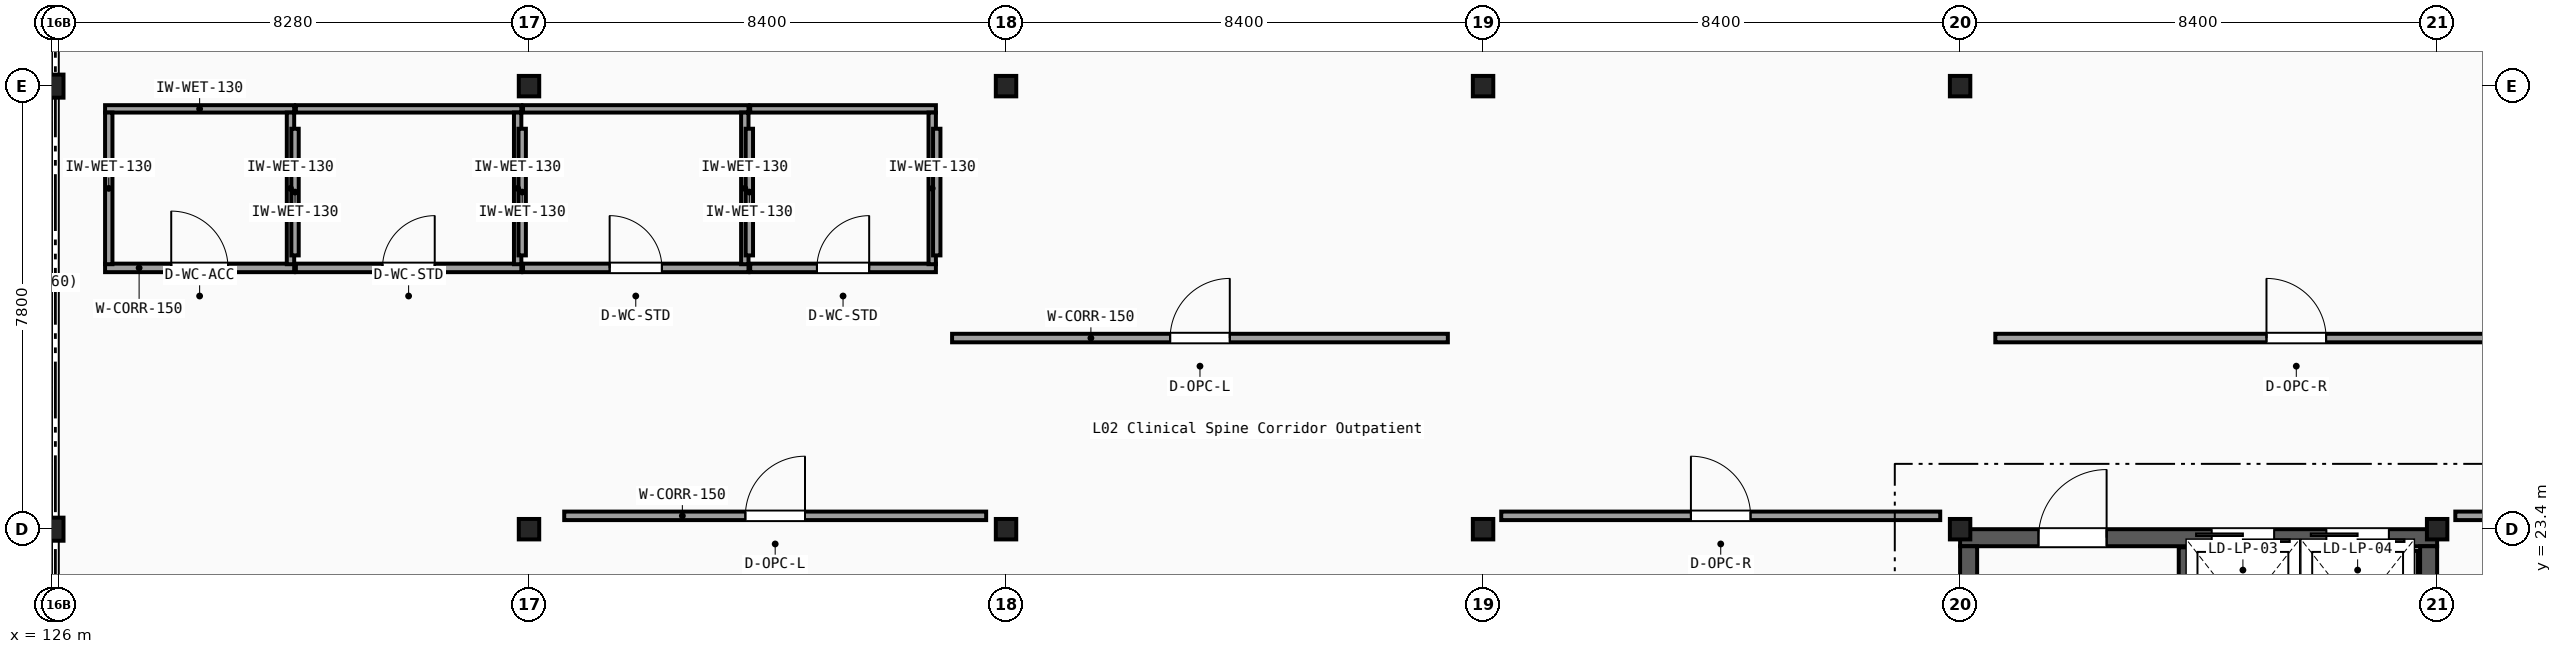
"""IFC4 building model, lengths in metres.
Left out: names, types, materials, properties, quantities, classifications, styles, units other than length and angle.
Written with IfcOpenShell. Run it as: python <this file> out.ifc"""

import sys

from ifc_helpers import new_model, si_unit, direction, frame, frame_2d, origin, origin_2d, place, context, subcontext, project, spatial, rectangle, hollow_circle, i_section, extrude, element, fill, save


model = new_model("IFC4")
c1 = context("Model", 3, precision=1e-05, world=origin(), true_north=direction((0.0, 1.0)))
c2 = subcontext(c1, "Body", "Model", "MODEL_VIEW")
j1 = project(units=[si_unit("LENGTHUNIT", "METRE"), si_unit("PLANEANGLEUNIT", "RADIAN")], contexts=[c1])
p1 = place(None, origin())
s1 = spatial("IfcSite", under=j1, at=p1, CompositionType="ELEMENT")
p2 = place(p1, origin())
s2 = spatial("IfcBuilding", under=s1, at=p2, CompositionType="ELEMENT")
p3 = place(p2, frame((0.0, 0.0, 10.2)))
s3 = spatial("IfcBuildingStorey", under=s2, at=p3, CompositionType="ELEMENT", Elevation=10.2)
for number, where, z_axis, x_axis in (
    (1, (134.4, 23.4, 0.0), (0.0, 0.0, 1.0), (1.0, 0.0, 0.0)),
    (2, (134.4, 31.2, 0.0), (0.0, 0.0, 1.0), (1.0, 0.0, 0.0)),
    (3, (142.8, 23.4, 0.0), (0.0, 0.0, 1.0), (1.0, 0.0, 0.0)),
    (4, (142.8, 31.2, 0.0), (0.0, 0.0, 1.0), (1.0, 0.0, 0.0)),
    (5, (151.2, 23.4, 0.0), (0.0, 0.0, 1.0), (1.0, 0.0, 0.0)),
    (6, (151.2, 31.2, 0.0), (0.0, 0.0, 1.0), (1.0, 0.0, 0.0)),
    (7, (159.6, 23.4, 0.0), (0.0, 0.0, 1.0), (1.0, 0.0, 0.0)),
    (8, (159.6, 31.2, 0.0), (0.0, 0.0, 1.0), (1.0, 0.0, 0.0)),
    (9, (168.0, 23.4, 0.0), (0.0, 0.0, 1.0), (1.0, 0.0, 0.0)),
):
    element("IfcColumn", number, at=place(p3, frame(where, z_axis=z_axis, x_axis=x_axis)), inside=s3, PredefinedType="COLUMN", context=c2, shape_type="SweptSolid", body=[
        extrude(i_section(OverallWidth=0.3, OverallDepth=0.36, WebThickness=0.012, FlangeThickness=0.022, FilletRadius=0.027, at=origin_2d()), origin(), (0.0, 0.0, 1.0), 4.65),
    ])
for number, where, z_axis, x_axis in (
    (10, (126.0, 23.4, 0.0), (0.0, 0.0, 1.0), (1.0, 0.0, 0.0)),
    (11, (126.0, 31.2, 0.0), (0.0, 0.0, 1.0), (1.0, 0.0, 0.0)),
):
    element("IfcColumn", number, at=place(p3, frame(where, z_axis=z_axis, x_axis=x_axis)), inside=s3, PredefinedType="COLUMN", context=c2, shape_type="SweptSolid", body=[
        extrude(hollow_circle(Radius=0.203, WallThickness=0.02, at=origin_2d()), origin(), (0.0, 0.0, 1.0), 4.65),
    ])
p4 = place(p3, frame((159.6, 23.25, 0.0), z_axis=(0.0, 0.0, 1.0), x_axis=(1.0, 0.0, 0.0)))
e12 = element("IfcWall", 12, at=p4, inside=s3, PredefinedType="SHEAR", context=c2, shape_type="SweptSolid", body=[
    extrude(rectangle(XDim=8.4, YDim=0.3, at=frame_2d((4.2, 0.0))), origin(), (0.0, 0.0, 1.0), 4.42),
])
p5 = place(p4, frame((1.38, 0.0, 0.0)))
e13 = element("IfcOpeningElement", 13, at=p5, cuts=e12, PredefinedType="OPENING", context=c2, shape_type="SweptSolid", body=[
    extrude(rectangle(XDim=1.2, YDim=2.15, at=frame_2d((0.6, 1.075))), frame((0.0, 0.16, 0.0), z_axis=(0.0, -1.0, 0.0), x_axis=(1.0, 0.0, 0.0)), (0.0, 0.0, 1.0), 0.32),
])
p6 = place(p4, frame((4.43, 0.0, 0.0)))
e14 = element("IfcOpeningElement", 14, at=p6, cuts=e12, PredefinedType="OPENING", context=c2, shape_type="SweptSolid", body=[
    extrude(rectangle(XDim=1.1, YDim=2.15, at=frame_2d((0.55, 1.075))), frame((0.0, 0.16, 0.0), z_axis=(0.0, -1.0, 0.0), x_axis=(1.0, 0.0, 0.0)), (0.0, 0.0, 1.0), 0.32),
])
p7 = place(p4, frame((6.45, 0.0, 0.0)))
e15 = element("IfcOpeningElement", 15, at=p7, cuts=e12, PredefinedType="OPENING", context=c2, shape_type="SweptSolid", body=[
    extrude(rectangle(XDim=1.1, YDim=2.15, at=frame_2d((0.55, 1.075))), frame((0.0, 0.16, 0.0), z_axis=(0.0, -1.0, 0.0), x_axis=(1.0, 0.0, 0.0)), (0.0, 0.0, 1.0), 0.32),
])
for number, where, z_axis, x_axis in (
    (16, (159.75, 15.9, 0.0), (0.0, 0.0, 1.0), (0.0, 1.0, 0.0)),
    (17, (167.85, 15.9, 0.0), (0.0, 0.0, 1.0), (0.0, 1.0, 0.0)),
):
    element("IfcWall", number, at=place(p3, frame(where, z_axis=z_axis, x_axis=x_axis)), inside=s3, PredefinedType="SHEAR", context=c2, shape_type="SweptSolid", body=[
        extrude(rectangle(XDim=7.2, YDim=0.3, at=frame_2d((3.6, 0.0))), origin(), (0.0, 0.0, 1.0), 4.42),
    ])
p8 = place(p3, frame((163.55, 15.92, 0.0), z_axis=(0.0, 0.0, 1.0), x_axis=(0.0, 1.0, 0.0)))
e18 = element("IfcWall", 18, at=p8, inside=s3, PredefinedType="SHEAR", context=c2, shape_type="SweptSolid", body=[
    extrude(rectangle(XDim=7.16, YDim=0.2, at=frame_2d((3.58, 0.0))), origin(), (0.0, 0.0, 1.0), 4.42),
])
for number, where, z_axis, x_axis in (
    (19, (165.54, 20.88, 0.0), (0.0, 0.0, 1.0), (0.0, 1.0, 0.0)),
    (20, (167.56, 20.88, 0.0), (0.0, 0.0, 1.0), (0.0, 1.0, 0.0)),
):
    element("IfcWall", number, at=place(p3, frame(where, z_axis=z_axis, x_axis=x_axis)), inside=s3, PredefinedType="PARTITIONING", context=c2, shape_type="SweptSolid", body=[
        extrude(rectangle(XDim=2.14, YDim=0.2, at=frame_2d((1.07, 0.0))), origin(), (0.0, 0.0, 1.0), 3.9),
    ])
p9 = place(p3, frame((126.935, 28.0, 0.0), z_axis=(0.0, 0.0, 1.0), x_axis=(1.0, 0.0, 0.0)))
e21 = element("IfcWall", 21, at=p9, inside=s3, PredefinedType="PARTITIONING", context=c2, shape_type="SweptSolid", body=[
    extrude(rectangle(XDim=3.33, YDim=0.15, at=frame_2d((1.665, 0.0))), origin(), (0.0, 0.0, 1.0), 4.37),
])
p10 = place(p9, frame((1.165, 0.0, 0.0)))
e22 = element("IfcOpeningElement", 22, at=p10, cuts=e21, PredefinedType="OPENING", context=c2, shape_type="SweptSolid", body=[
    extrude(rectangle(XDim=1.0, YDim=2.15, at=frame_2d((0.5, 1.075))), frame((0.0, 0.085, 0.0), z_axis=(0.0, -1.0, 0.0), x_axis=(1.0, 0.0, 0.0)), (0.0, 0.0, 1.0), 0.17),
])
p11 = place(p3, frame((126.935, 30.8, 0.0), z_axis=(0.0, 0.0, 1.0), x_axis=(1.0, 0.0, 0.0)))
e23 = element("IfcWall", 23, at=p11, inside=s3, PredefinedType="PARTITIONING", context=c2, shape_type="SweptSolid", body=[
    extrude(rectangle(XDim=3.33, YDim=0.13, at=frame_2d((1.665, 0.0))), origin(), (0.0, 0.0, 1.0), 4.37),
])
for number, where, z_axis, x_axis in (
    (24, (127.0, 28.065, 0.0), (0.0, 0.0, 1.0), (0.0, 1.0, 0.0)),
    (25, (130.2, 28.065, 0.0), (0.0, 0.0, 1.0), (0.0, 1.0, 0.0)),
):
    element("IfcWall", number, at=place(p3, frame(where, z_axis=z_axis, x_axis=x_axis)), inside=s3, PredefinedType="PARTITIONING", context=c2, shape_type="SweptSolid", body=[
        extrude(rectangle(XDim=2.67, YDim=0.13, at=frame_2d((1.335, 0.0))), origin(), (0.0, 0.0, 1.0), 4.37),
    ])
p12 = place(p3, frame((130.28, 28.22, 0.0), z_axis=(0.0, 0.0, 1.0), x_axis=(0.0, 1.0, 0.0)))
e26 = element("IfcWall", 26, at=p12, inside=s3, PredefinedType="PARTITIONING", context=c2, shape_type="SweptSolid", body=[
    extrude(rectangle(XDim=2.23, YDim=0.13, at=frame_2d((1.115, 0.0))), origin(), (0.0, 0.0, 1.0), 4.37),
])
p13 = place(p3, frame((130.295, 28.0, 0.0), z_axis=(0.0, 0.0, 1.0), x_axis=(1.0, 0.0, 0.0)))
e27 = element("IfcWall", 27, at=p13, inside=s3, PredefinedType="PARTITIONING", context=c2, shape_type="SweptSolid", body=[
    extrude(rectangle(XDim=3.97, YDim=0.15, at=frame_2d((1.985, 0.0))), origin(), (0.0, 0.0, 1.0), 4.0),
])
p14 = place(p13, frame((1.525, 0.0, 0.0)))
e28 = element("IfcOpeningElement", 28, at=p14, cuts=e27, PredefinedType="OPENING", context=c2, shape_type="SweptSolid", body=[
    extrude(rectangle(XDim=0.92, YDim=2.15, at=frame_2d((0.46, 1.075))), frame((0.0, 0.085, 0.0), z_axis=(0.0, -1.0, 0.0), x_axis=(1.0, 0.0, 0.0)), (0.0, 0.0, 1.0), 0.17),
])
p15 = place(p3, frame((130.295, 30.8, 0.0), z_axis=(0.0, 0.0, 1.0), x_axis=(1.0, 0.0, 0.0)))
e29 = element("IfcWall", 29, at=p15, inside=s3, PredefinedType="PARTITIONING", context=c2, shape_type="SweptSolid", body=[
    extrude(rectangle(XDim=3.97, YDim=0.13, at=frame_2d((1.985, 0.0))), origin(), (0.0, 0.0, 1.0), 4.0),
])
p16 = place(p3, frame((134.2, 28.065, 0.0), z_axis=(0.0, 0.0, 1.0), x_axis=(0.0, 1.0, 0.0)))
e30 = element("IfcWall", 30, at=p16, inside=s3, PredefinedType="PARTITIONING", context=c2, shape_type="SweptSolid", body=[
    extrude(rectangle(XDim=2.67, YDim=0.13, at=frame_2d((1.335, 0.0))), origin(), (0.0, 0.0, 1.0), 4.0),
])
p17 = place(p3, frame((134.28, 28.22, 0.0), z_axis=(0.0, 0.0, 1.0), x_axis=(0.0, 1.0, 0.0)))
e31 = element("IfcWall", 31, at=p17, inside=s3, PredefinedType="PARTITIONING", context=c2, shape_type="SweptSolid", body=[
    extrude(rectangle(XDim=2.23, YDim=0.13, at=frame_2d((1.115, 0.0))), origin(), (0.0, 0.0, 1.0), 4.0),
])
p18 = place(p3, frame((134.295, 28.0, 0.0), z_axis=(0.0, 0.0, 1.0), x_axis=(1.0, 0.0, 0.0)))
e32 = element("IfcWall", 32, at=p18, inside=s3, PredefinedType="PARTITIONING", context=c2, shape_type="SweptSolid", body=[
    extrude(rectangle(XDim=3.97, YDim=0.15, at=frame_2d((1.985, 0.0))), origin(), (0.0, 0.0, 1.0), 4.0),
])
p19 = place(p18, frame((1.525, 0.0, 0.0)))
e33 = element("IfcOpeningElement", 33, at=p19, cuts=e32, PredefinedType="OPENING", context=c2, shape_type="SweptSolid", body=[
    extrude(rectangle(XDim=0.92, YDim=2.15, at=frame_2d((0.46, 1.075))), frame((0.0, 0.085, 0.0), z_axis=(0.0, -1.0, 0.0), x_axis=(1.0, 0.0, 0.0)), (0.0, 0.0, 1.0), 0.17),
])
p20 = place(p3, frame((134.295, 30.8, 0.0), z_axis=(0.0, 0.0, 1.0), x_axis=(1.0, 0.0, 0.0)))
e34 = element("IfcWall", 34, at=p20, inside=s3, PredefinedType="PARTITIONING", context=c2, shape_type="SweptSolid", body=[
    extrude(rectangle(XDim=3.97, YDim=0.13, at=frame_2d((1.985, 0.0))), origin(), (0.0, 0.0, 1.0), 4.0),
])
p21 = place(p3, frame((138.2, 28.065, 0.0), z_axis=(0.0, 0.0, 1.0), x_axis=(0.0, 1.0, 0.0)))
e35 = element("IfcWall", 35, at=p21, inside=s3, PredefinedType="PARTITIONING", context=c2, shape_type="SweptSolid", body=[
    extrude(rectangle(XDim=2.67, YDim=0.13, at=frame_2d((1.335, 0.0))), origin(), (0.0, 0.0, 1.0), 4.37),
])
p22 = place(p3, frame((138.28, 28.22, 0.0), z_axis=(0.0, 0.0, 1.0), x_axis=(0.0, 1.0, 0.0)))
e36 = element("IfcWall", 36, at=p22, inside=s3, PredefinedType="PARTITIONING", context=c2, shape_type="SweptSolid", body=[
    extrude(rectangle(XDim=2.23, YDim=0.13, at=frame_2d((1.115, 0.0))), origin(), (0.0, 0.0, 1.0), 4.37),
])
p23 = place(p3, frame((138.295, 28.0, 0.0), z_axis=(0.0, 0.0, 1.0), x_axis=(1.0, 0.0, 0.0)))
e37 = element("IfcWall", 37, at=p23, inside=s3, PredefinedType="PARTITIONING", context=c2, shape_type="SweptSolid", body=[
    extrude(rectangle(XDim=3.27, YDim=0.15, at=frame_2d((1.635, 0.0))), origin(), (0.0, 0.0, 1.0), 4.37),
])
p24 = place(p23, frame((1.175, 0.0, 0.0)))
e38 = element("IfcOpeningElement", 38, at=p24, cuts=e37, PredefinedType="OPENING", context=c2, shape_type="SweptSolid", body=[
    extrude(rectangle(XDim=0.92, YDim=2.15, at=frame_2d((0.46, 1.075))), frame((0.0, 0.085, 0.0), z_axis=(0.0, -1.0, 0.0), x_axis=(1.0, 0.0, 0.0)), (0.0, 0.0, 1.0), 0.17),
])
p25 = place(p3, frame((138.295, 30.8, 0.0), z_axis=(0.0, 0.0, 1.0), x_axis=(1.0, 0.0, 0.0)))
e39 = element("IfcWall", 39, at=p25, inside=s3, PredefinedType="PARTITIONING", context=c2, shape_type="SweptSolid", body=[
    extrude(rectangle(XDim=3.27, YDim=0.13, at=frame_2d((1.635, 0.0))), origin(), (0.0, 0.0, 1.0), 4.37),
])
p26 = place(p3, frame((141.5, 28.065, 0.0), z_axis=(0.0, 0.0, 1.0), x_axis=(0.0, 1.0, 0.0)))
e40 = element("IfcWall", 40, at=p26, inside=s3, PredefinedType="PARTITIONING", context=c2, shape_type="SweptSolid", body=[
    extrude(rectangle(XDim=2.67, YDim=0.13, at=frame_2d((1.335, 0.0))), origin(), (0.0, 0.0, 1.0), 4.37),
])
p27 = place(p3, frame((141.58, 28.22, 0.0), z_axis=(0.0, 0.0, 1.0), x_axis=(0.0, 1.0, 0.0)))
e41 = element("IfcWall", 41, at=p27, inside=s3, PredefinedType="PARTITIONING", context=c2, shape_type="SweptSolid", body=[
    extrude(rectangle(XDim=2.23, YDim=0.13, at=frame_2d((1.115, 0.0))), origin(), (0.0, 0.0, 1.0), 4.37),
])
p28 = place(p3, frame((135.02, 23.635, 0.0), z_axis=(0.0, 0.0, 1.0), x_axis=(1.0, 0.0, 0.0)))
e42 = element("IfcWall", 42, at=p28, inside=s3, PredefinedType="PARTITIONING", context=c2, shape_type="SweptSolid", body=[
    extrude(rectangle(XDim=7.43, YDim=0.15, at=frame_2d((3.715, 0.0))), origin(), (0.0, 0.0, 1.0), 3.9),
])
p29 = place(p28, frame((3.19, 0.0, 0.0)))
e43 = element("IfcOpeningElement", 43, at=p29, cuts=e42, PredefinedType="OPENING", context=c2, shape_type="SweptSolid", body=[
    extrude(rectangle(XDim=1.05, YDim=2.15, at=frame_2d((0.525, 1.075))), frame((0.0, 0.085, 0.0), z_axis=(0.0, -1.0, 0.0), x_axis=(1.0, 0.0, 0.0)), (0.0, 0.0, 1.0), 0.17),
])
p30 = place(p3, frame((151.52, 23.635, 0.0), z_axis=(0.0, 0.0, 1.0), x_axis=(1.0, 0.0, 0.0)))
e44 = element("IfcWall", 44, at=p30, inside=s3, PredefinedType="PARTITIONING", context=c2, shape_type="SweptSolid", body=[
    extrude(rectangle(XDim=7.73, YDim=0.15, at=frame_2d((3.865, 0.0))), origin(), (0.0, 0.0, 1.0), 3.9),
])
p31 = place(p30, frame((3.34, 0.0, 0.0)))
e45 = element("IfcOpeningElement", 45, at=p31, cuts=e44, PredefinedType="OPENING", context=c2, shape_type="SweptSolid", body=[
    extrude(rectangle(XDim=1.05, YDim=2.15, at=frame_2d((0.525, 1.075))), frame((0.0, 0.085, 0.0), z_axis=(0.0, -1.0, 0.0), x_axis=(1.0, 0.0, 0.0)), (0.0, 0.0, 1.0), 0.17),
])
p32 = place(p3, frame((168.32, 23.635, 0.0), z_axis=(0.0, 0.0, 1.0), x_axis=(1.0, 0.0, 0.0)))
e46 = element("IfcWall", 46, at=p32, inside=s3, PredefinedType="PARTITIONING", context=c2, shape_type="SweptSolid", body=[
    extrude(rectangle(XDim=11.97, YDim=0.15, at=frame_2d((5.985, 0.0))), origin(), (0.0, 0.0, 1.0), 3.8),
])
p33 = place(p32, frame((5.46, 0.0, 0.0)))
e47 = element("IfcOpeningElement", 47, at=p33, cuts=e46, PredefinedType="OPENING", context=c2, shape_type="SweptSolid", body=[
    extrude(rectangle(XDim=1.05, YDim=2.15, at=frame_2d((0.525, 1.075))), frame((0.0, 0.085, 0.0), z_axis=(0.0, -1.0, 0.0), x_axis=(1.0, 0.0, 0.0)), (0.0, 0.0, 1.0), 0.17),
])
p34 = place(p3, frame((141.85, 26.765, 0.0), z_axis=(0.0, 0.0, 1.0), x_axis=(1.0, 0.0, 0.0)))
e48 = element("IfcWall", 48, at=p34, inside=s3, PredefinedType="PARTITIONING", context=c2, shape_type="SweptSolid", body=[
    extrude(rectangle(XDim=8.73, YDim=0.15, at=frame_2d((4.365, 0.0))), origin(), (0.0, 0.0, 1.0), 4.0),
])
p35 = place(p34, frame((3.84, 0.0, 0.0)))
e49 = element("IfcOpeningElement", 49, at=p35, cuts=e48, PredefinedType="OPENING", context=c2, shape_type="SweptSolid", body=[
    extrude(rectangle(XDim=1.05, YDim=2.15, at=frame_2d((0.525, 1.075))), frame((0.0, 0.085, 0.0), z_axis=(0.0, -1.0, 0.0), x_axis=(1.0, 0.0, 0.0)), (0.0, 0.0, 1.0), 0.17),
])
p36 = place(p3, frame((160.22, 26.765, 0.0), z_axis=(0.0, 0.0, 1.0), x_axis=(1.0, 0.0, 0.0)))
e50 = element("IfcWall", 50, at=p36, inside=s3, PredefinedType="PARTITIONING", context=c2, shape_type="SweptSolid", body=[
    extrude(rectangle(XDim=10.6, YDim=0.15, at=frame_2d((5.3, 0.0))), origin(), (0.0, 0.0, 1.0), 4.0),
])
p37 = place(p36, frame((4.775, 0.0, 0.0)))
e51 = element("IfcOpeningElement", 51, at=p37, cuts=e50, PredefinedType="OPENING", context=c2, shape_type="SweptSolid", body=[
    extrude(rectangle(XDim=1.05, YDim=2.15, at=frame_2d((0.525, 1.075))), frame((0.0, 0.085, 0.0), z_axis=(0.0, -1.0, 0.0), x_axis=(1.0, 0.0, 0.0)), (0.0, 0.0, 1.0), 0.17),
])
p38 = place(p5, origin())
e52 = element("IfcDoor", 52, at=p38, inside=s3, OperationType="SINGLE_SWING_RIGHT", PredefinedType="DOOR", context=c2, shape_type="SweptSolid", body=[
    extrude(rectangle(XDim=1.2, YDim=2.15, at=frame_2d((0.6, 1.075))), frame((0.0, 0.025, 0.0), z_axis=(0.0, -1.0, 0.0), x_axis=(1.0, 0.0, 0.0)), (0.0, 0.0, 1.0), 0.05),
])
fill(e13, e52)
p39 = place(p6, origin())
e53 = element("IfcDoor", 53, at=p39, inside=s3, OperationType="DOUBLE_DOOR_SLIDING", PredefinedType="DOOR", context=c2, shape_type="SweptSolid", body=[
    extrude(rectangle(XDim=1.1, YDim=2.15, at=frame_2d((0.55, 1.075))), frame((0.0, 0.025, 0.0), z_axis=(0.0, -1.0, 0.0), x_axis=(1.0, 0.0, 0.0)), (0.0, 0.0, 1.0), 0.05),
])
fill(e14, e53)
p40 = place(p7, origin())
e54 = element("IfcDoor", 54, at=p40, inside=s3, OperationType="DOUBLE_DOOR_SLIDING", PredefinedType="DOOR", context=c2, shape_type="SweptSolid", body=[
    extrude(rectangle(XDim=1.1, YDim=2.15, at=frame_2d((0.55, 1.075))), frame((0.0, 0.025, 0.0), z_axis=(0.0, -1.0, 0.0), x_axis=(1.0, 0.0, 0.0)), (0.0, 0.0, 1.0), 0.05),
])
fill(e15, e54)
p41 = place(p10, origin())
e55 = element("IfcDoor", 55, at=p41, inside=s3, OperationType="SINGLE_SWING_LEFT", PredefinedType="DOOR", context=c2, shape_type="SweptSolid", body=[
    extrude(rectangle(XDim=1.0, YDim=2.15, at=frame_2d((0.5, 1.075))), frame((0.0, 0.025, 0.0), z_axis=(0.0, -1.0, 0.0), x_axis=(1.0, 0.0, 0.0)), (0.0, 0.0, 1.0), 0.05),
])
fill(e22, e55)
p42 = place(p14, origin())
e56 = element("IfcDoor", 56, at=p42, inside=s3, OperationType="SINGLE_SWING_RIGHT", PredefinedType="DOOR", context=c2, shape_type="SweptSolid", body=[
    extrude(rectangle(XDim=0.92, YDim=2.15, at=frame_2d((0.46, 1.075))), frame((0.0, 0.025, 0.0), z_axis=(0.0, -1.0, 0.0), x_axis=(1.0, 0.0, 0.0)), (0.0, 0.0, 1.0), 0.05),
])
fill(e28, e56)
p43 = place(p19, origin())
e57 = element("IfcDoor", 57, at=p43, inside=s3, OperationType="SINGLE_SWING_LEFT", PredefinedType="DOOR", context=c2, shape_type="SweptSolid", body=[
    extrude(rectangle(XDim=0.92, YDim=2.15, at=frame_2d((0.46, 1.075))), frame((0.0, 0.025, 0.0), z_axis=(0.0, -1.0, 0.0), x_axis=(1.0, 0.0, 0.0)), (0.0, 0.0, 1.0), 0.05),
])
fill(e33, e57)
p44 = place(p24, origin())
e58 = element("IfcDoor", 58, at=p44, inside=s3, OperationType="SINGLE_SWING_RIGHT", PredefinedType="DOOR", context=c2, shape_type="SweptSolid", body=[
    extrude(rectangle(XDim=0.92, YDim=2.15, at=frame_2d((0.46, 1.075))), frame((0.0, 0.025, 0.0), z_axis=(0.0, -1.0, 0.0), x_axis=(1.0, 0.0, 0.0)), (0.0, 0.0, 1.0), 0.05),
])
fill(e38, e58)
p45 = place(p29, origin())
e59 = element("IfcDoor", 59, at=p45, inside=s3, OperationType="SINGLE_SWING_RIGHT", PredefinedType="DOOR", context=c2, shape_type="SweptSolid", body=[
    extrude(rectangle(XDim=1.05, YDim=2.15, at=frame_2d((0.525, 1.075))), frame((0.0, 0.025, 0.0), z_axis=(0.0, -1.0, 0.0), x_axis=(1.0, 0.0, 0.0)), (0.0, 0.0, 1.0), 0.05),
])
fill(e43, e59)
p46 = place(p31, origin())
e60 = element("IfcDoor", 60, at=p46, inside=s3, OperationType="SINGLE_SWING_LEFT", PredefinedType="DOOR", context=c2, shape_type="SweptSolid", body=[
    extrude(rectangle(XDim=1.05, YDim=2.15, at=frame_2d((0.525, 1.075))), frame((0.0, 0.025, 0.0), z_axis=(0.0, -1.0, 0.0), x_axis=(1.0, 0.0, 0.0)), (0.0, 0.0, 1.0), 0.05),
])
fill(e45, e60)
p47 = place(p35, origin())
e61 = element("IfcDoor", 61, at=p47, inside=s3, OperationType="SINGLE_SWING_RIGHT", PredefinedType="DOOR", context=c2, shape_type="SweptSolid", body=[
    extrude(rectangle(XDim=1.05, YDim=2.15, at=frame_2d((0.525, 1.075))), frame((0.0, 0.025, 0.0), z_axis=(0.0, -1.0, 0.0), x_axis=(1.0, 0.0, 0.0)), (0.0, 0.0, 1.0), 0.05),
])
fill(e49, e61)
p48 = place(p37, origin())
e62 = element("IfcDoor", 62, at=p48, inside=s3, OperationType="SINGLE_SWING_LEFT", PredefinedType="DOOR", context=c2, shape_type="SweptSolid", body=[
    extrude(rectangle(XDim=1.05, YDim=2.15, at=frame_2d((0.525, 1.075))), frame((0.0, 0.025, 0.0), z_axis=(0.0, -1.0, 0.0), x_axis=(1.0, 0.0, 0.0)), (0.0, 0.0, 1.0), 0.05),
])
fill(e51, e62)
save(model, sys.argv[1])
